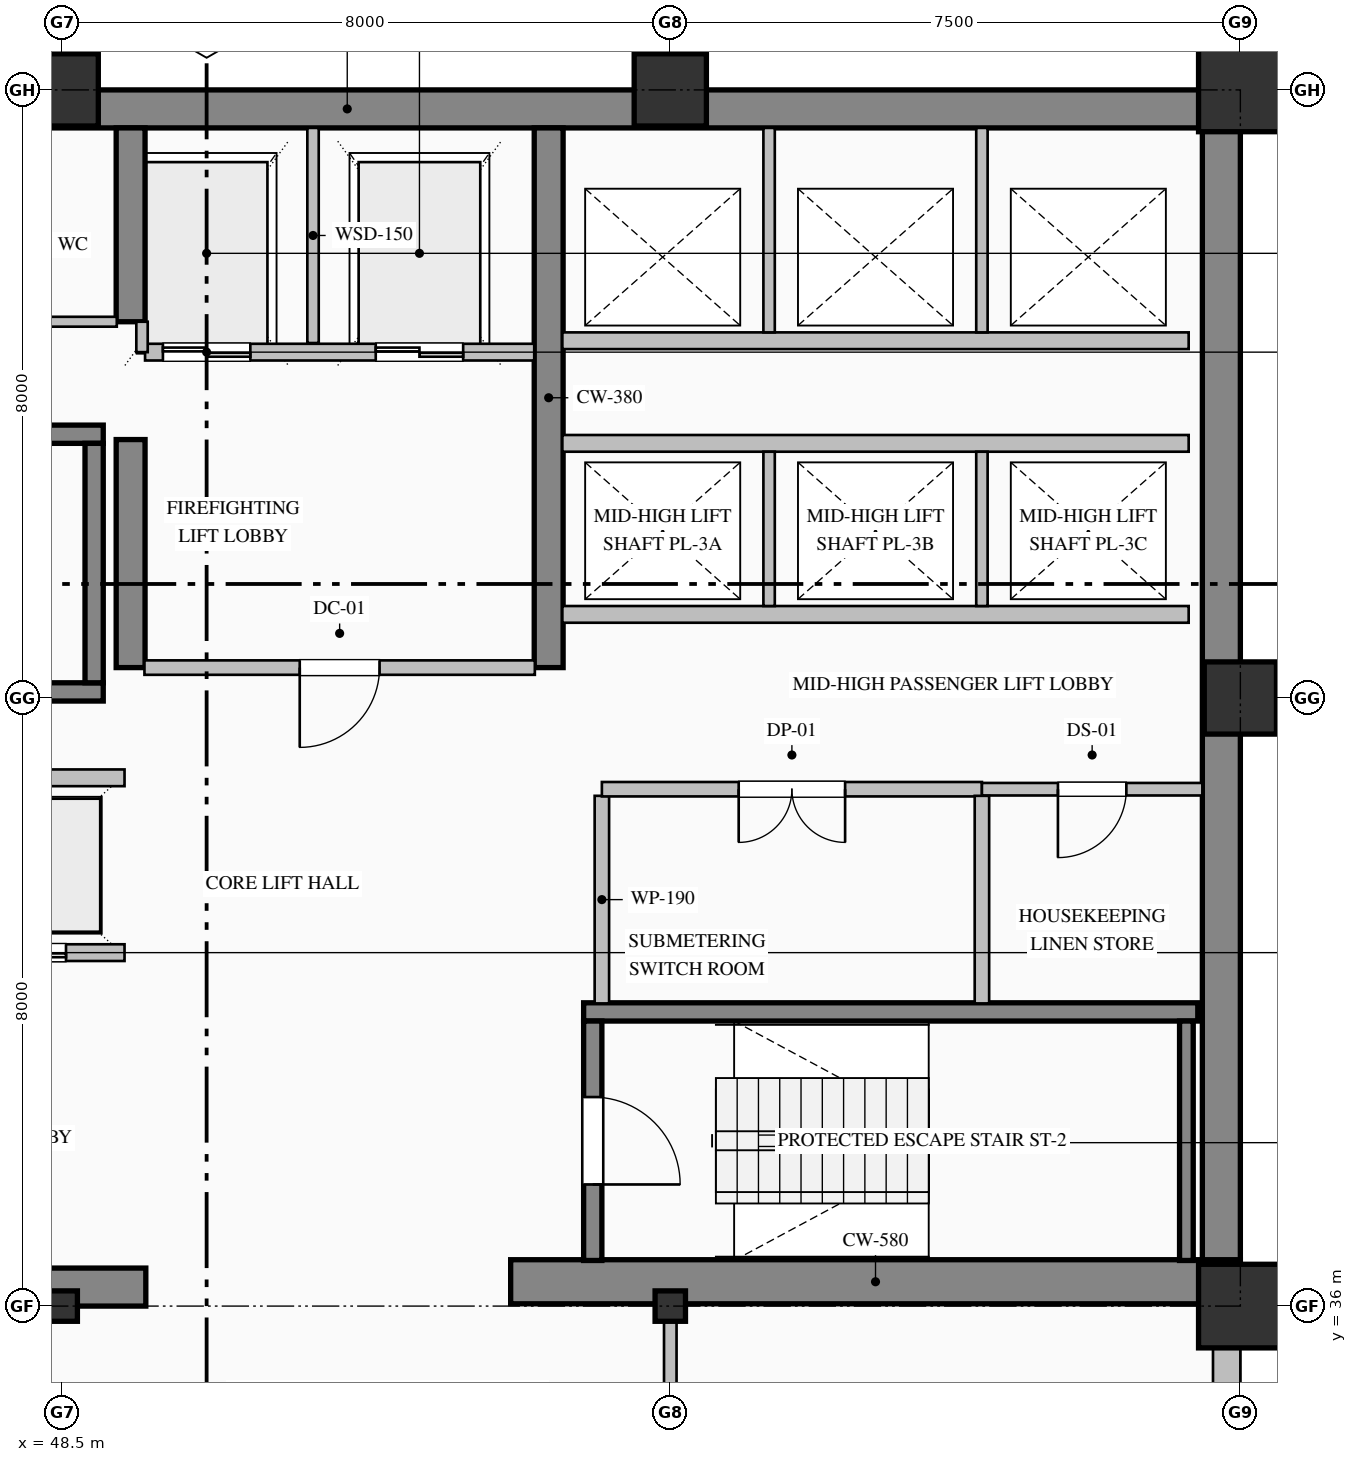
"""IFC4 building model, lengths in metres.
Left out: names, types, materials, properties, quantities, classifications, styles, units other than length and angle.
Written with IfcOpenShell. Run it as: python <this file> out.ifc"""

import sys

from ifc_helpers import new_model, si_unit, direction, frame, frame_2d, origin, origin_2d, place, context, subcontext, project, spatial, rectangle, hollow_rectangle, i_section, extrude, element, fill, save


model = new_model("IFC4")
c1 = context("Model", 3, precision=1e-05, world=origin(), true_north=direction((0.0, 1.0)))
c2 = subcontext(c1, "Body", "Model", "MODEL_VIEW")
j1 = project(units=[si_unit("LENGTHUNIT", "METRE"), si_unit("PLANEANGLEUNIT", "RADIAN")], contexts=[c1])
p1 = place(None, origin())
s1 = spatial("IfcSite", under=j1, at=p1, CompositionType="ELEMENT")
p2 = place(p1, origin())
s2 = spatial("IfcBuilding", under=s1, at=p2, CompositionType="ELEMENT")
p3 = place(p2, frame((0.0, 0.0, 179.0)))
s3 = spatial("IfcBuildingStorey", under=s2, at=p3, CompositionType="ELEMENT", Elevation=179.0)
p4 = place(p3, frame((40.5, 51.75, 0.0), z_axis=(0.0, 0.0, 1.0), x_axis=(1.0, 0.0, 0.0)))
e1 = element("IfcWall", 1, at=p4, inside=s3, PredefinedType="SHEAR", context=c2, shape_type="SweptSolid", body=[
    extrude(rectangle(XDim=23.5, YDim=0.5, at=frame_2d((11.75, 0.0))), origin(), (0.0, 0.0, 1.0), 3.765),
])
p5 = place(p3, frame((63.75, 36.32, 0.0), z_axis=(0.0, 0.0, 1.0), x_axis=(0.0, 1.0, 0.0)))
e2 = element("IfcWall", 2, at=p5, inside=s3, PredefinedType="SHEAR", context=c2, shape_type="SweptSolid", body=[
    extrude(rectangle(XDim=15.18, YDim=0.5, at=frame_2d((7.59, 0.0))), origin(), (0.0, 0.0, 1.0), 3.765),
])
p6 = place(p3, frame((40.5, 36.25, 0.0), z_axis=(0.0, 0.0, 1.0), x_axis=(1.0, 0.0, 0.0)))
e3 = element("IfcWall", 3, at=p6, inside=s3, PredefinedType="SHEAR", context=c2, shape_type="SweptSolid", body=[
    extrude(rectangle(XDim=9.1, YDim=0.5, at=frame_2d((4.55, 0.0))), origin(), (0.0, 0.0, 1.0), 3.765),
])
p7 = place(p3, frame((54.4, 36.32, 0.0), z_axis=(0.0, 0.0, 1.0), x_axis=(1.0, 0.0, 0.0)))
e4 = element("IfcWall", 4, at=p7, inside=s3, PredefinedType="SHEAR", context=c2, shape_type="SweptSolid", body=[
    extrude(rectangle(XDim=9.6, YDim=0.58, at=frame_2d((4.8, 0.0))), origin(), (0.0, 0.0, 1.0), 4.0),
])
p8 = place(p3, frame((49.4, 44.4, 0.0), z_axis=(0.0, 0.0, 1.0), x_axis=(0.0, 1.0, 0.0)))
e5 = element("IfcWall", 5, at=p8, inside=s3, PredefinedType="SHEAR", context=c2, shape_type="SweptSolid", body=[
    extrude(rectangle(XDim=3.0, YDim=0.38, at=frame_2d((1.5, 0.0))), origin(), (0.0, 0.0, 1.0), 3.765),
])
p9 = place(p3, frame((49.4, 48.95, 0.0), z_axis=(0.0, 0.0, 1.0), x_axis=(0.0, 1.0, 0.0)))
e6 = element("IfcWall", 6, at=p9, inside=s3, PredefinedType="SHEAR", context=c2, shape_type="SweptSolid", body=[
    extrude(rectangle(XDim=2.55, YDim=0.38, at=frame_2d((1.275, 0.0))), origin(), (0.0, 0.0, 1.0), 3.765),
])
p10 = place(p3, frame((54.9, 44.4, 0.0), z_axis=(0.0, 0.0, 1.0), x_axis=(0.0, 1.0, 0.0)))
e7 = element("IfcWall", 7, at=p10, inside=s3, PredefinedType="SHEAR", context=c2, shape_type="SweptSolid", body=[
    extrude(rectangle(XDim=7.1, YDim=0.38, at=frame_2d((3.55, 0.0))), origin(), (0.0, 0.0, 1.0), 3.765),
])
p11 = place(p3, frame((48.5, 36.0, 0.0), z_axis=(0.0, 0.0, 1.0), x_axis=(1.0, 0.0, 0.0)))
e8 = element("IfcColumn", 8, at=p11, inside=s3, PredefinedType="COLUMN", context=c2, shape_type="SweptSolid", body=[
    extrude(i_section(OverallWidth=0.4, OverallDepth=0.4, WebThickness=0.013, FlangeThickness=0.021, FilletRadius=0.022, at=origin_2d()), origin(), (0.0, 0.0, 1.0), 4.0),
])
p12 = place(p3, frame((48.5, 52.0, 0.0), z_axis=(0.0, 0.0, 1.0), x_axis=(1.0, 0.0, 0.0)))
e9 = element("IfcColumn", 9, at=p12, inside=s3, PredefinedType="COLUMN", context=c2, shape_type="SweptSolid", body=[
    extrude(hollow_rectangle(XDim=0.95, YDim=0.95, WallThickness=0.036, at=origin_2d()), origin(), (0.0, 0.0, 1.0), 4.0),
])
p13 = place(p3, frame((56.5, 36.0, 0.0), z_axis=(0.0, 0.0, 1.0), x_axis=(1.0, 0.0, 0.0)))
e10 = element("IfcColumn", 10, at=p13, inside=s3, PredefinedType="COLUMN", context=c2, shape_type="SweptSolid", body=[
    extrude(i_section(OverallWidth=0.4, OverallDepth=0.4, WebThickness=0.013, FlangeThickness=0.021, FilletRadius=0.022, at=origin_2d()), origin(), (0.0, 0.0, 1.0), 4.0),
])
p14 = place(p3, frame((56.5, 52.0, 0.0), z_axis=(0.0, 0.0, 1.0), x_axis=(1.0, 0.0, 0.0)))
e11 = element("IfcColumn", 11, at=p14, inside=s3, PredefinedType="COLUMN", context=c2, shape_type="SweptSolid", body=[
    extrude(hollow_rectangle(XDim=0.95, YDim=0.95, WallThickness=0.036, at=origin_2d()), origin(), (0.0, 0.0, 1.0), 4.0),
])
p15 = place(p3, frame((64.0, 36.0, 0.0), z_axis=(0.0, 0.0, 1.0), x_axis=(1.0, 0.0, 0.0)))
e12 = element("IfcColumn", 12, at=p15, inside=s3, PredefinedType="COLUMN", context=c2, shape_type="SweptSolid", body=[
    extrude(hollow_rectangle(XDim=1.1, YDim=1.1, WallThickness=0.04, at=origin_2d()), origin(), (0.0, 0.0, 1.0), 4.0),
])
p16 = place(p3, frame((64.0, 44.0, 0.0), z_axis=(0.0, 0.0, 1.0), x_axis=(1.0, 0.0, 0.0)))
e13 = element("IfcColumn", 13, at=p16, inside=s3, PredefinedType="COLUMN", context=c2, shape_type="SweptSolid", body=[
    extrude(hollow_rectangle(XDim=0.95, YDim=0.95, WallThickness=0.036, at=origin_2d()), origin(), (0.0, 0.0, 1.0), 4.0),
])
p17 = place(p3, frame((64.0, 52.0, 0.0), z_axis=(0.0, 0.0, 1.0), x_axis=(1.0, 0.0, 0.0)))
e14 = element("IfcColumn", 14, at=p17, inside=s3, PredefinedType="COLUMN", context=c2, shape_type="SweptSolid", body=[
    extrude(hollow_rectangle(XDim=1.1, YDim=1.1, WallThickness=0.04, at=origin_2d()), origin(), (0.0, 0.0, 1.0), 4.0),
])
p18 = place(p3, frame((63.82, 36.05, 0.0), z_axis=(0.0, 0.0, 1.0), x_axis=(0.0, -1.0, 0.0)))
e15 = element("IfcWall", 15, at=p18, inside=s3, PredefinedType="SOLIDWALL", context=c2, shape_type="SweptSolid", body=[
    extrude(rectangle(XDim=28.05, YDim=0.36, at=frame_2d((14.025, 0.0))), origin(), (0.0, 0.0, 1.0), 3.265),
])
p19 = place(p18, frame((2.775, 0.0, 0.85)))
e16 = element("IfcOpeningElement", 16, at=p19, cuts=e15, PredefinedType="OPENING", context=c2, shape_type="SweptSolid", body=[
    extrude(rectangle(XDim=1.65, YDim=1.95, at=frame_2d((0.825, 0.975))), frame((0.0, 0.19, 0.0), z_axis=(0.0, -1.0, 0.0), x_axis=(1.0, 0.0, 0.0)), (0.0, 0.0, 1.0), 0.38),
])
p20 = place(p18, frame((13.575, 0.0, 0.85)))
e17 = element("IfcOpeningElement", 17, at=p20, cuts=e15, PredefinedType="OPENING", context=c2, shape_type="SweptSolid", body=[
    extrude(rectangle(XDim=1.65, YDim=1.95, at=frame_2d((0.825, 0.975))), frame((0.0, 0.19, 0.0), z_axis=(0.0, -1.0, 0.0), x_axis=(1.0, 0.0, 0.0)), (0.0, 0.0, 1.0), 0.38),
])
for number, where, z_axis, x_axis in (
    (18, (40.96, 47.47, 0.0), (0.0, 0.0, 1.0), (1.0, 0.0, 0.0)),
    (19, (49.04, 44.08, 0.0), (0.0, 0.0, 1.0), (-1.0, 0.0, 0.0)),
):
    element("IfcWall", number, at=place(p3, frame(where, z_axis=z_axis, x_axis=x_axis)), inside=s3, PredefinedType="SOLIDWALL", context=c2, shape_type="SweptSolid", body=[
        extrude(rectangle(XDim=8.08, YDim=0.24, at=frame_2d((4.04, 0.0))), origin(), (0.0, 0.0, 1.0), 4.0),
    ])
p21 = place(p3, frame((48.92, 44.2, 0.0), z_axis=(0.0, 0.0, 1.0), x_axis=(0.0, 1.0, 0.0)))
e20 = element("IfcWall", 20, at=p21, inside=s3, PredefinedType="SOLIDWALL", context=c2, shape_type="SweptSolid", body=[
    extrude(rectangle(XDim=3.15, YDim=0.24, at=frame_2d((1.575, 0.0))), origin(), (0.0, 0.0, 1.0), 4.0),
])
p22 = place(p3, frame((55.36, 39.87, 0.0), z_axis=(0.0, 0.0, 1.0), x_axis=(1.0, 0.0, 0.0)))
e21 = element("IfcWall", 21, at=p22, inside=s3, PredefinedType="SOLIDWALL", context=c2, shape_type="SweptSolid", body=[
    extrude(rectangle(XDim=8.08, YDim=0.24, at=frame_2d((4.04, 0.0))), origin(), (0.0, 0.0, 1.0), 4.0),
])
p23 = place(p3, frame((55.48, 39.75, 0.0), z_axis=(0.0, 0.0, 1.0), x_axis=(0.0, -1.0, 0.0)))
e22 = element("IfcWall", 22, at=p23, inside=s3, PredefinedType="SOLIDWALL", context=c2, shape_type="SweptSolid", body=[
    extrude(rectangle(XDim=3.15, YDim=0.24, at=frame_2d((1.575, 0.0))), origin(), (0.0, 0.0, 1.0), 4.0),
])
p24 = place(p23, frame((1.0, 0.0, 0.0)))
e23 = element("IfcOpeningElement", 23, at=p24, cuts=e22, PredefinedType="OPENING", context=c2, shape_type="SweptSolid", body=[
    extrude(rectangle(XDim=1.15, YDim=2.2, at=frame_2d((0.575, 1.1))), frame((0.0, 0.13, 0.0), z_axis=(0.0, -1.0, 0.0), x_axis=(1.0, 0.0, 0.0)), (0.0, 0.0, 1.0), 0.26),
])
p25 = place(p3, frame((63.29, 36.6, 0.0), z_axis=(0.0, 0.0, 1.0), x_axis=(0.0, 1.0, 0.0)))
e24 = element("IfcWall", 24, at=p25, inside=s3, PredefinedType="SOLIDWALL", context=c2, shape_type="SweptSolid", body=[
    extrude(rectangle(XDim=3.15, YDim=0.18, at=frame_2d((1.575, 0.0))), origin(), (0.0, 0.0, 1.0), 4.0),
])
p26 = place(p3, frame((54.71, 48.55, 0.0), z_axis=(0.0, 0.0, 1.0), x_axis=(-1.0, 0.0, 0.0)))
e25 = element("IfcWall", 25, at=p26, inside=s3, PredefinedType="PARTITIONING", context=c2, shape_type="SweptSolid", body=[
    extrude(rectangle(XDim=5.12, YDim=0.22, at=frame_2d((2.56, 0.0))), origin(), (0.0, 0.0, 1.0), 3.765),
])
p27 = place(p26, frame((3.735, 0.0, 0.0)))
e26 = element("IfcOpeningElement", 26, at=p27, cuts=e25, PredefinedType="OPENING", context=c2, shape_type="SweptSolid", body=[
    extrude(rectangle(XDim=1.15, YDim=2.2, at=frame_2d((0.575, 1.1))), frame((0.0, 0.12, 0.0), z_axis=(0.0, -1.0, 0.0), x_axis=(1.0, 0.0, 0.0)), (0.0, 0.0, 1.0), 0.24),
])
p28 = place(p26, frame((0.935, 0.0, 0.0)))
e27 = element("IfcOpeningElement", 27, at=p28, cuts=e25, PredefinedType="OPENING", context=c2, shape_type="SweptSolid", body=[
    extrude(rectangle(XDim=1.15, YDim=2.2, at=frame_2d((0.575, 1.1))), frame((0.0, 0.12, 0.0), z_axis=(0.0, -1.0, 0.0), x_axis=(1.0, 0.0, 0.0)), (0.0, 0.0, 1.0), 0.24),
])
p29 = place(p3, frame((51.8, 48.67, 0.0), z_axis=(0.0, 0.0, 1.0), x_axis=(0.0, 1.0, 0.0)))
e28 = element("IfcWall", 28, at=p29, inside=s3, PredefinedType="PARTITIONING", context=c2, shape_type="SweptSolid", body=[
    extrude(rectangle(XDim=2.83, YDim=0.15, at=frame_2d((1.415, 0.0))), origin(), (0.0, 0.0, 1.0), 3.765),
])
p30 = place(p3, frame((49.55, 48.55, 0.0), z_axis=(0.0, 0.0, 1.0), x_axis=(0.0, 1.0, 0.0)))
e29 = element("IfcWall", 29, at=p30, inside=s3, PredefinedType="PARTITIONING", context=c2, shape_type="SweptSolid", body=[
    extrude(rectangle(XDim=0.4, YDim=0.15, at=frame_2d((0.2, 0.0))), origin(), (0.0, 0.0, 1.0), 3.765),
])
p31 = place(p3, frame((49.32, 40.65, 0.0), z_axis=(0.0, 0.0, 1.0), x_axis=(-1.0, 0.0, 0.0)))
e30 = element("IfcWall", 30, at=p31, inside=s3, PredefinedType="PARTITIONING", context=c2, shape_type="SweptSolid", body=[
    extrude(rectangle(XDim=8.24, YDim=0.22, at=frame_2d((4.12, 0.0))), origin(), (0.0, 0.0, 1.0), 3.765),
])
p32 = place(p31, frame((6.37, 0.0, 0.0)))
e31 = element("IfcOpeningElement", 31, at=p32, cuts=e30, PredefinedType="OPENING", context=c2, shape_type="SweptSolid", body=[
    extrude(rectangle(XDim=1.1, YDim=2.2, at=frame_2d((0.55, 1.1))), frame((0.0, 0.12, 0.0), z_axis=(0.0, -1.0, 0.0), x_axis=(1.0, 0.0, 0.0)), (0.0, 0.0, 1.0), 0.24),
])
p33 = place(p31, frame((3.57, 0.0, 0.0)))
e32 = element("IfcOpeningElement", 32, at=p33, cuts=e30, PredefinedType="OPENING", context=c2, shape_type="SweptSolid", body=[
    extrude(rectangle(XDim=1.1, YDim=2.2, at=frame_2d((0.55, 1.1))), frame((0.0, 0.12, 0.0), z_axis=(0.0, -1.0, 0.0), x_axis=(1.0, 0.0, 0.0)), (0.0, 0.0, 1.0), 0.24),
])
p34 = place(p31, frame((0.77, 0.0, 0.0)))
e33 = element("IfcOpeningElement", 33, at=p34, cuts=e30, PredefinedType="OPENING", context=c2, shape_type="SweptSolid", body=[
    extrude(rectangle(XDim=1.1, YDim=2.2, at=frame_2d((0.55, 1.1))), frame((0.0, 0.12, 0.0), z_axis=(0.0, -1.0, 0.0), x_axis=(1.0, 0.0, 0.0)), (0.0, 0.0, 1.0), 0.24),
])
for number, where, z_axis, x_axis in (
    (34, (41.08, 42.95, 0.0), (0.0, 0.0, 1.0), (1.0, 0.0, 0.0)),
    (35, (63.32, 45.1, 0.0), (0.0, 0.0, 1.0), (-1.0, 0.0, 0.0)),
    (36, (55.08, 47.35, 0.0), (0.0, 0.0, 1.0), (1.0, 0.0, 0.0)),
):
    element("IfcWall", number, at=place(p3, frame(where, z_axis=z_axis, x_axis=x_axis)), inside=s3, PredefinedType="PARTITIONING", context=c2, shape_type="SweptSolid", body=[
        extrude(rectangle(XDim=8.24, YDim=0.22, at=frame_2d((4.12, 0.0))), origin(), (0.0, 0.0, 1.0), 3.765),
    ])
for number, where, z_axis, x_axis in (
    (37, (57.8, 45.21, 0.0), (0.0, 0.0, 1.0), (0.0, 1.0, 0.0)),
    (38, (60.6, 45.21, 0.0), (0.0, 0.0, 1.0), (0.0, 1.0, 0.0)),
):
    element("IfcWall", number, at=place(p3, frame(where, z_axis=z_axis, x_axis=x_axis)), inside=s3, PredefinedType="PARTITIONING", context=c2, shape_type="SweptSolid", body=[
        extrude(rectangle(XDim=2.03, YDim=0.15, at=frame_2d((1.015, 0.0))), origin(), (0.0, 0.0, 1.0), 3.765),
    ])
p35 = place(p3, frame((63.32, 48.7, 0.0), z_axis=(0.0, 0.0, 1.0), x_axis=(-1.0, 0.0, 0.0)))
e39 = element("IfcWall", 39, at=p35, inside=s3, PredefinedType="PARTITIONING", context=c2, shape_type="SweptSolid", body=[
    extrude(rectangle(XDim=8.24, YDim=0.22, at=frame_2d((4.12, 0.0))), origin(), (0.0, 0.0, 1.0), 3.765),
])
for number, where, z_axis, x_axis in (
    (40, (57.8, 48.81, 0.0), (0.0, 0.0, 1.0), (0.0, 1.0, 0.0)),
    (41, (60.6, 48.81, 0.0), (0.0, 0.0, 1.0), (0.0, 1.0, 0.0)),
):
    element("IfcWall", number, at=place(p3, frame(where, z_axis=z_axis, x_axis=x_axis)), inside=s3, PredefinedType="PARTITIONING", context=c2, shape_type="SweptSolid", body=[
        extrude(rectangle(XDim=2.69, YDim=0.15, at=frame_2d((1.345, 0.0))), origin(), (0.0, 0.0, 1.0), 3.765),
    ])
p36 = place(p3, frame((43.5, 48.95, 0.0), z_axis=(0.0, 0.0, 1.0), x_axis=(1.0, 0.0, 0.0)))
e42 = element("IfcWall", 42, at=p36, inside=s3, PredefinedType="PARTITIONING", context=c2, shape_type="SweptSolid", body=[
    extrude(rectangle(XDim=5.718, YDim=0.13, at=frame_2d((2.859, 0.0))), origin(), (0.0, 0.0, 1.0), 3.765),
])
p37 = place(p36, frame((2.399, 0.0, 0.0)))
e43 = element("IfcOpeningElement", 43, at=p37, cuts=e42, PredefinedType="OPENING", context=c2, shape_type="SweptSolid", body=[
    extrude(rectangle(XDim=0.92, YDim=2.15, at=frame_2d((0.46, 1.075))), frame((0.0, 0.075, 0.0), z_axis=(0.0, -1.0, 0.0), x_axis=(1.0, 0.0, 0.0)), (0.0, 0.0, 1.0), 0.15),
])
p38 = place(p3, frame((54.718, 44.4, 0.0), z_axis=(0.0, 0.0, 1.0), x_axis=(-1.0, 0.0, 0.0)))
e44 = element("IfcWall", 44, at=p38, inside=s3, PredefinedType="PARTITIONING", context=c2, shape_type="SweptSolid", body=[
    extrude(rectangle(XDim=5.136, YDim=0.19, at=frame_2d((2.568, 0.0))), origin(), (0.0, 0.0, 1.0), 3.765),
])
p39 = place(p38, frame((2.043, 0.0, 0.0)))
e45 = element("IfcOpeningElement", 45, at=p39, cuts=e44, PredefinedType="OPENING", context=c2, shape_type="SweptSolid", body=[
    extrude(rectangle(XDim=1.05, YDim=2.15, at=frame_2d((0.525, 1.075))), frame((0.0, 0.105, 0.0), z_axis=(0.0, -1.0, 0.0), x_axis=(1.0, 0.0, 0.0)), (0.0, 0.0, 1.0), 0.21),
])
p40 = place(p3, frame((55.6, 42.713, 0.0), z_axis=(0.0, 0.0, 1.0), x_axis=(0.0, -1.0, 0.0)))
e46 = element("IfcWall", 46, at=p40, inside=s3, PredefinedType="PARTITIONING", context=c2, shape_type="SweptSolid", body=[
    extrude(rectangle(XDim=2.731, YDim=0.19, at=frame_2d((1.365, 0.0))), origin(), (0.0, 0.0, 1.0), 3.765),
])
p41 = place(p3, frame((60.6, 42.8, 0.0), z_axis=(0.0, 0.0, 1.0), x_axis=(-1.0, 0.0, 0.0)))
e47 = element("IfcWall", 47, at=p41, inside=s3, PredefinedType="PARTITIONING", context=c2, shape_type="SweptSolid", body=[
    extrude(rectangle(XDim=5.0, YDim=0.19, at=frame_2d((2.5, 0.0))), origin(), (0.0, 0.0, 1.0), 3.765),
])
p42 = place(p41, frame((1.8, 0.0, 0.0)))
e48 = element("IfcOpeningElement", 48, at=p42, cuts=e47, PredefinedType="OPENING", context=c2, shape_type="SweptSolid", body=[
    extrude(rectangle(XDim=1.4, YDim=2.25, at=frame_2d((0.7, 1.125))), frame((0.0, 0.105, 0.0), z_axis=(0.0, -1.0, 0.0), x_axis=(1.0, 0.0, 0.0)), (0.0, 0.0, 1.0), 0.21),
])
p43 = place(p3, frame((63.5, 42.8, 0.0), z_axis=(0.0, 0.0, 1.0), x_axis=(-1.0, 0.0, 0.0)))
e49 = element("IfcWall", 49, at=p43, inside=s3, PredefinedType="PARTITIONING", context=c2, shape_type="SweptSolid", body=[
    extrude(rectangle(XDim=2.9, YDim=0.165, at=frame_2d((1.45, 0.0))), origin(), (0.0, 0.0, 1.0), 3.765),
])
p44 = place(p43, frame((1.0, 0.0, 0.0)))
e50 = element("IfcOpeningElement", 50, at=p44, cuts=e49, PredefinedType="OPENING", context=c2, shape_type="SweptSolid", body=[
    extrude(rectangle(XDim=0.9, YDim=2.15, at=frame_2d((0.45, 1.075))), frame((0.0, 0.093, 0.0), z_axis=(0.0, -1.0, 0.0), x_axis=(1.0, 0.0, 0.0)), (0.0, 0.0, 1.0), 0.185),
])
p45 = place(p3, frame((60.6, 42.713, 0.0), z_axis=(0.0, 0.0, 1.0), x_axis=(0.0, -1.0, 0.0)))
e51 = element("IfcWall", 51, at=p45, inside=s3, PredefinedType="PARTITIONING", context=c2, shape_type="SweptSolid", body=[
    extrude(rectangle(XDim=2.731, YDim=0.19, at=frame_2d((1.365, 0.0))), origin(), (0.0, 0.0, 1.0), 3.765),
])
p46 = place(p3, frame((56.5, 36.0, 0.0), z_axis=(0.0, 0.0, 1.0), x_axis=(0.0, -1.0, 0.0)))
e52 = element("IfcWall", 52, at=p46, inside=s3, PredefinedType="PARTITIONING", context=c2, shape_type="SweptSolid", body=[
    extrude(rectangle(XDim=2.325, YDim=0.165, at=frame_2d((1.163, 0.0))), origin(), (0.0, 0.0, 1.0), 3.157),
])
p47 = place(p24, origin())
e53 = element("IfcDoor", 53, at=p47, inside=s3, OperationType="SINGLE_SWING_RIGHT", PredefinedType="DOOR", context=c2, shape_type="SweptSolid", body=[
    extrude(rectangle(XDim=1.15, YDim=2.2, at=frame_2d((0.575, 1.1))), frame((0.0, 0.025, 0.0), z_axis=(0.0, -1.0, 0.0), x_axis=(1.0, 0.0, 0.0)), (0.0, 0.0, 1.0), 0.05),
])
fill(e23, e53)
p48 = place(p27, origin())
e54 = element("IfcDoor", 54, at=p48, inside=s3, OperationType="DOUBLE_DOOR_SLIDING", PredefinedType="DOOR", context=c2, shape_type="SweptSolid", body=[
    extrude(rectangle(XDim=1.15, YDim=2.2, at=frame_2d((0.575, 1.1))), frame((0.0, 0.025, 0.0), z_axis=(0.0, -1.0, 0.0), x_axis=(1.0, 0.0, 0.0)), (0.0, 0.0, 1.0), 0.05),
])
fill(e26, e54)
p49 = place(p28, origin())
e55 = element("IfcDoor", 55, at=p49, inside=s3, OperationType="DOUBLE_DOOR_SLIDING", PredefinedType="DOOR", context=c2, shape_type="SweptSolid", body=[
    extrude(rectangle(XDim=1.15, YDim=2.2, at=frame_2d((0.575, 1.1))), frame((0.0, 0.025, 0.0), z_axis=(0.0, -1.0, 0.0), x_axis=(1.0, 0.0, 0.0)), (0.0, 0.0, 1.0), 0.05),
])
fill(e27, e55)
p50 = place(p34, origin())
e56 = element("IfcDoor", 56, at=p50, inside=s3, OperationType="DOUBLE_DOOR_SLIDING", PredefinedType="DOOR", context=c2, shape_type="SweptSolid", body=[
    extrude(rectangle(XDim=1.1, YDim=2.2, at=frame_2d((0.55, 1.1))), frame((0.0, 0.025, 0.0), z_axis=(0.0, -1.0, 0.0), x_axis=(1.0, 0.0, 0.0)), (0.0, 0.0, 1.0), 0.05),
])
fill(e33, e56)
p51 = place(p39, origin())
e57 = element("IfcDoor", 57, at=p51, inside=s3, OperationType="SINGLE_SWING_RIGHT", PredefinedType="DOOR", context=c2, shape_type="SweptSolid", body=[
    extrude(rectangle(XDim=1.05, YDim=2.15, at=frame_2d((0.525, 1.075))), frame((0.0, 0.025, 0.0), z_axis=(0.0, -1.0, 0.0), x_axis=(1.0, 0.0, 0.0)), (0.0, 0.0, 1.0), 0.05),
])
fill(e45, e57)
p52 = place(p42, origin())
e58 = element("IfcDoor", 58, at=p52, inside=s3, OperationType="DOUBLE_DOOR_SINGLE_SWING", PredefinedType="DOOR", context=c2, shape_type="SweptSolid", body=[
    extrude(rectangle(XDim=1.4, YDim=2.25, at=frame_2d((0.7, 1.125))), frame((0.0, 0.025, 0.0), z_axis=(0.0, -1.0, 0.0), x_axis=(1.0, 0.0, 0.0)), (0.0, 0.0, 1.0), 0.05),
])
fill(e48, e58)
p53 = place(p44, origin())
e59 = element("IfcDoor", 59, at=p53, inside=s3, OperationType="SINGLE_SWING_RIGHT", PredefinedType="DOOR", context=c2, shape_type="SweptSolid", body=[
    extrude(rectangle(XDim=0.9, YDim=2.15, at=frame_2d((0.45, 1.075))), frame((0.0, 0.025, 0.0), z_axis=(0.0, -1.0, 0.0), x_axis=(1.0, 0.0, 0.0)), (0.0, 0.0, 1.0), 0.05),
])
fill(e50, e59)
save(model, sys.argv[1])
